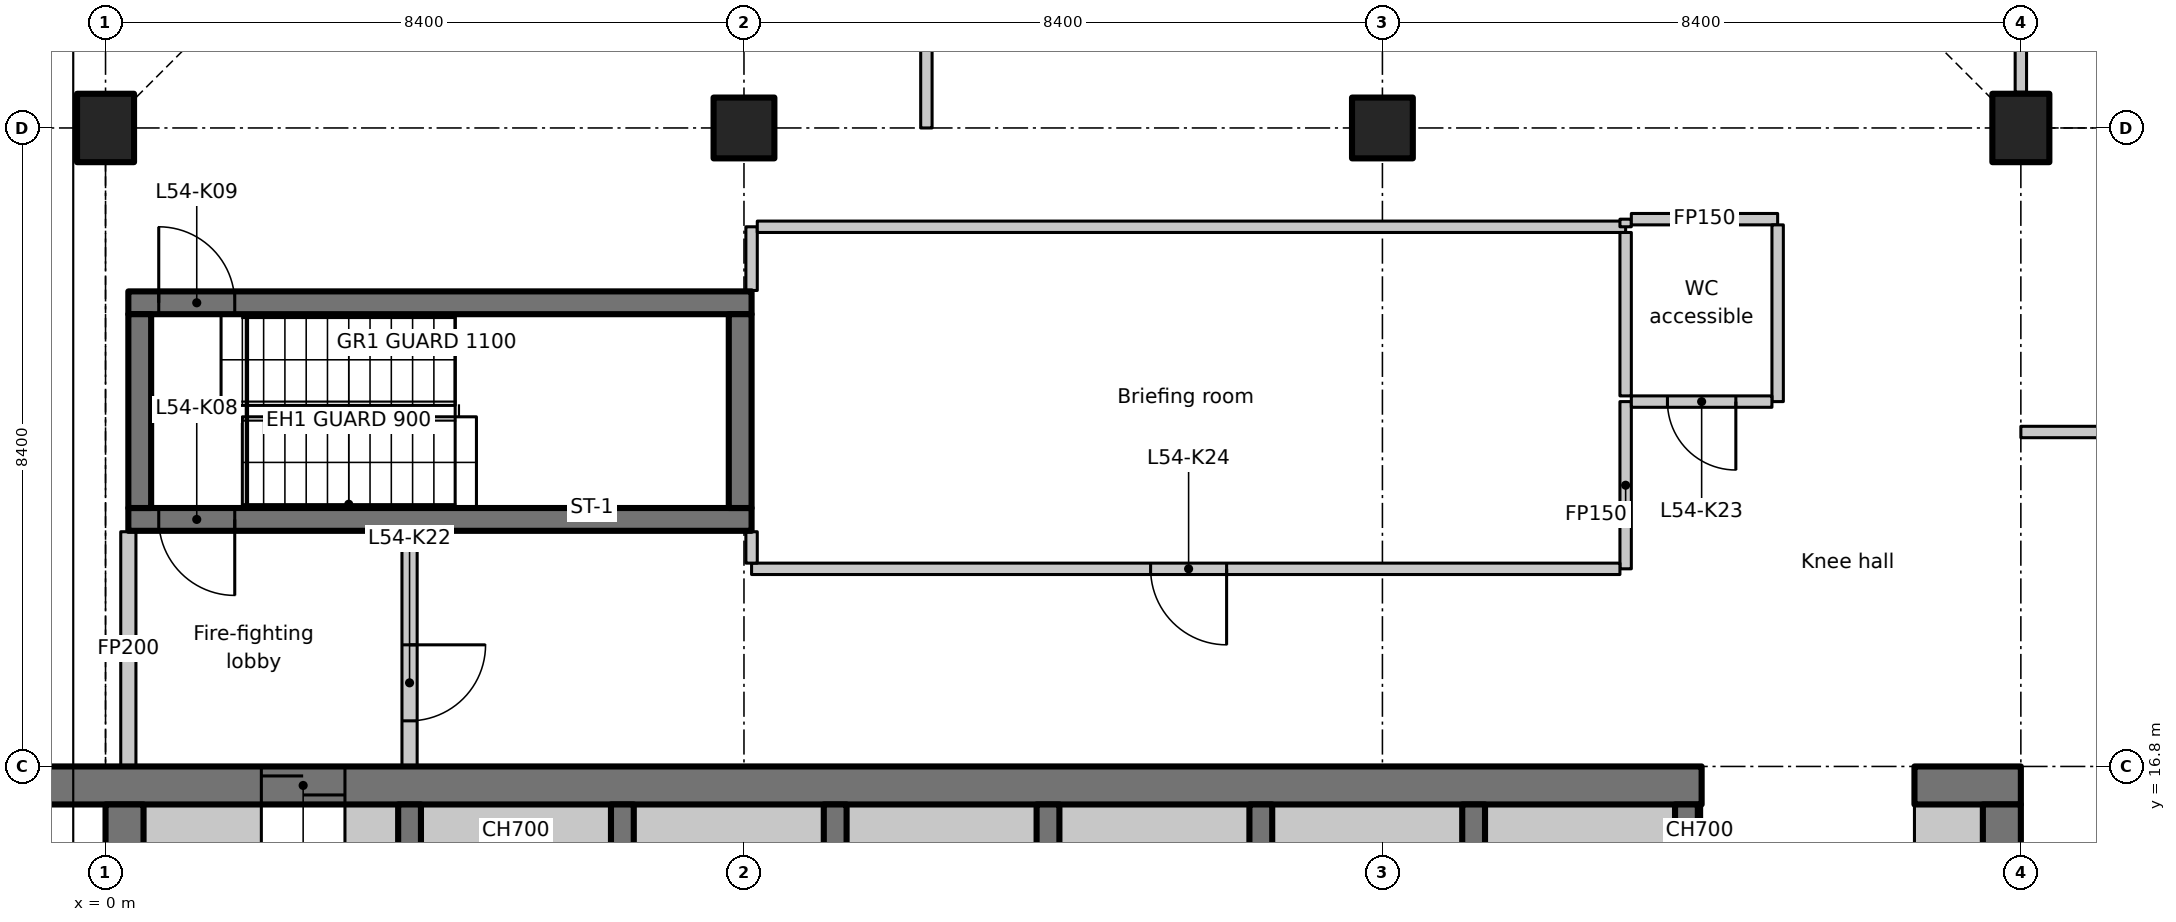
"""IFC4 building model, lengths in metres.
Left out: names, types, materials, properties, quantities, classifications, styles, units other than length and angle.
Written with IfcOpenShell. Run it as: python <this file> out.ifc"""

import sys

from ifc_helpers import new_model, si_unit, direction, frame, frame_2d, origin, origin_2d, place, context, subcontext, project, spatial, polyline, rectangle, outline, extrude, element, fill, save


model = new_model("IFC4")
c1 = context("Model", 3, precision=1e-05, world=origin(), true_north=direction((0.0, 1.0)))
c2 = subcontext(c1, "Body", "Model", "MODEL_VIEW")
j1 = project(units=[si_unit("LENGTHUNIT", "METRE"), si_unit("PLANEANGLEUNIT", "RADIAN")], contexts=[c1])
p1 = place(None, origin())
s1 = spatial("IfcSite", under=j1, at=p1, CompositionType="ELEMENT")
p2 = place(p1, origin())
s2 = spatial("IfcBuilding", under=s1, at=p2, CompositionType="ELEMENT")
p3 = place(p2, frame((0.0, 0.0, 215.7)))
s3 = spatial("IfcBuildingStorey", under=s2, at=p3, CompositionType="ELEMENT", Elevation=215.7)
p4 = place(p3, frame((0.0, 25.2, 0.0), z_axis=(0.0, 0.0, 1.0), x_axis=(1.0, 0.0, 0.0)))
e1 = element("IfcColumn", 1, at=p4, inside=s3, PredefinedType="COLUMN", context=c2, shape_type="SweptSolid", body=[
    extrude(rectangle(XDim=0.75, YDim=0.9, at=origin_2d()), origin(), (0.0, 0.0, 1.0), 3.35),
])
for number, where, z_axis, x_axis in (
    (2, (8.4, 25.2, 0.0), (0.0, 0.0, 1.0), (1.0, 0.0, 0.0)),
    (3, (16.8, 25.2, 0.0), (0.0, 0.0, 1.0), (1.0, 0.0, 0.0)),
):
    element("IfcColumn", number, at=place(p3, frame(where, z_axis=z_axis, x_axis=x_axis)), inside=s3, PredefinedType="COLUMN", context=c2, shape_type="SweptSolid", body=[
        extrude(rectangle(XDim=0.8, YDim=0.8, at=origin_2d()), origin(), (0.0, 0.0, 1.0), 3.35),
    ])
p5 = place(p3, frame((25.2, 25.2, 0.0), z_axis=(0.0, 0.0, 1.0), x_axis=(1.0, 0.0, 0.0)))
e4 = element("IfcColumn", 4, at=p5, inside=s3, PredefinedType="COLUMN", context=c2, shape_type="SweptSolid", body=[
    extrude(rectangle(XDim=0.75, YDim=0.9, at=origin_2d()), origin(), (0.0, 0.0, 1.0), 3.35),
])
p6 = place(p3, frame((-1.1, 16.55, 0.0), z_axis=(0.0, 0.0, 1.0), x_axis=(1.0, 0.0, 0.0)))
e5 = element("IfcWall", 5, at=p6, inside=s3, PredefinedType="SHEAR", context=c2, shape_type="SweptSolid", body=[
    extrude(rectangle(XDim=22.1, YDim=0.5, at=frame_2d((11.05, 0.0))), origin(), (0.0, 0.0, 1.0), 3.35),
])
p7 = place(p6, frame((3.15, 0.0, 0.0)))
e6 = element("IfcOpeningElement", 6, at=p7, cuts=e5, PredefinedType="OPENING", context=c2, shape_type="SweptSolid", body=[
    extrude(rectangle(XDim=1.1, YDim=2.3, at=frame_2d((0.55, 1.15))), frame((0.0, 0.26, 0.0), z_axis=(0.0, -1.0, 0.0), x_axis=(1.0, 0.0, 0.0)), (0.0, 0.0, 1.0), 0.52),
])
p8 = place(p3, frame((23.8, 16.55, 0.0), z_axis=(0.0, 0.0, 1.0), x_axis=(1.0, 0.0, 0.0)))
e7 = element("IfcWall", 7, at=p8, inside=s3, PredefinedType="SHEAR", context=c2, shape_type="SweptSolid", body=[
    extrude(rectangle(XDim=1.4, YDim=0.5, at=frame_2d((0.7, 0.0))), origin(), (0.0, 0.0, 1.0), 3.35),
])
p9 = place(p3, frame((0.25, 7.436, 0.0), z_axis=(0.0, 0.0, 1.0), x_axis=(0.0, 1.0, 0.0)))
e8 = element("IfcWall", 8, at=p9, inside=s3, PredefinedType="SHEAR", context=c2, shape_type="SweptSolid", body=[
    extrude(rectangle(XDim=8.864, YDim=0.5, at=frame_2d((4.432, 0.0))), origin(), (0.0, 0.0, 1.0), 3.35),
])
p10 = place(p3, frame((24.95, 12.6, 0.0), z_axis=(0.0, 0.0, 1.0), x_axis=(0.0, 1.0, 0.0)))
e9 = element("IfcWall", 9, at=p10, inside=s3, PredefinedType="SHEAR", context=c2, shape_type="SweptSolid", body=[
    extrude(rectangle(XDim=3.7, YDim=0.5, at=frame_2d((1.85, 0.0))), origin(), (0.0, 0.0, 1.0), 3.35),
])
p11 = place(p3, frame((0.5, 15.95, 0.0), z_axis=(0.0, 0.0, 1.0), x_axis=(1.0, 0.0, 0.0)))
e10 = element("IfcWall", 10, at=p11, inside=s3, PredefinedType="PARTITIONING", context=c2, shape_type="SweptSolid", body=[
    extrude(rectangle(XDim=1.55, YDim=0.7, at=frame_2d((0.775, 0.0))), origin(), (0.0, 0.0, 1.0), 3.35),
])
p12 = place(p3, frame((23.8, 15.95, 0.0), z_axis=(0.0, 0.0, 1.0), x_axis=(1.0, 0.0, 0.0)))
e11 = element("IfcWall", 11, at=p12, inside=s3, PredefinedType="PARTITIONING", context=c2, shape_type="SweptSolid", body=[
    extrude(rectangle(XDim=0.9, YDim=0.7, at=frame_2d((0.45, 0.0))), origin(), (0.0, 0.0, 1.0), 3.35),
])
for number, where, z_axis, x_axis in (
    (12, (4.0, 12.95, 0.0), (0.0, 0.0, 1.0), (0.0, 1.0, 0.0)),
    (13, (6.8, 12.95, 0.0), (0.0, 0.0, 1.0), (0.0, 1.0, 0.0)),
    (14, (9.6, 12.95, 0.0), (0.0, 0.0, 1.0), (0.0, 1.0, 0.0)),
    (15, (12.4, 12.95, 0.0), (0.0, 0.0, 1.0), (0.0, 1.0, 0.0)),
    (16, (15.2, 12.95, 0.0), (0.0, 0.0, 1.0), (0.0, 1.0, 0.0)),
    (17, (18.0, 12.95, 0.0), (0.0, 0.0, 1.0), (0.0, 1.0, 0.0)),
    (18, (20.8, 12.95, 0.0), (0.0, 0.0, 1.0), (0.0, 1.0, 0.0)),
):
    element("IfcWall", number, at=place(p3, frame(where, z_axis=z_axis, x_axis=x_axis)), inside=s3, PredefinedType="SHEAR", context=c2, shape_type="SweptSolid", body=[
        extrude(rectangle(XDim=3.35, YDim=0.3, at=frame_2d((1.675, 0.0))), origin(), (0.0, 0.0, 1.0), 3.35),
    ])
p13 = place(p3, frame((8.5, 20.05, 0.0), z_axis=(0.0, 0.0, 1.0), x_axis=(-1.0, 0.0, 0.0)))
e19 = element("IfcWall", 19, at=p13, inside=s3, PredefinedType="SHEAR", context=c2, shape_type="SweptSolid", body=[
    extrude(rectangle(XDim=8.2, YDim=0.3, at=frame_2d((4.1, 0.0))), origin(), (0.0, 0.0, 1.0), 3.35),
])
p14 = place(p13, frame((6.8, 0.0, 0.0)))
e20 = element("IfcOpeningElement", 20, at=p14, cuts=e19, PredefinedType="OPENING", context=c2, shape_type="SweptSolid", body=[
    extrude(rectangle(XDim=1.0, YDim=2.1, at=frame_2d((0.5, 1.05))), frame((0.0, 0.16, 0.0), z_axis=(0.0, -1.0, 0.0), x_axis=(1.0, 0.0, 0.0)), (0.0, 0.0, 1.0), 0.32),
])
p15 = place(p3, frame((0.3, 22.9, 0.0), z_axis=(0.0, 0.0, 1.0), x_axis=(1.0, 0.0, 0.0)))
e21 = element("IfcWall", 21, at=p15, inside=s3, PredefinedType="SHEAR", context=c2, shape_type="SweptSolid", body=[
    extrude(rectangle(XDim=8.2, YDim=0.3, at=frame_2d((4.1, 0.0))), origin(), (0.0, 0.0, 1.0), 3.35),
])
p16 = place(p15, frame((0.4, 0.0, 0.0)))
e22 = element("IfcOpeningElement", 22, at=p16, cuts=e21, PredefinedType="OPENING", context=c2, shape_type="SweptSolid", body=[
    extrude(rectangle(XDim=1.0, YDim=2.1, at=frame_2d((0.5, 1.05))), frame((0.0, 0.16, 0.0), z_axis=(0.0, -1.0, 0.0), x_axis=(1.0, 0.0, 0.0)), (0.0, 0.0, 1.0), 0.32),
])
for number, where, z_axis, x_axis in (
    (23, (0.45, 20.2, 0.0), (0.0, 0.0, 1.0), (0.0, 1.0, 0.0)),
    (24, (8.35, 20.2, 0.0), (0.0, 0.0, 1.0), (0.0, 1.0, 0.0)),
):
    element("IfcWall", number, at=place(p3, frame(where, z_axis=z_axis, x_axis=x_axis)), inside=s3, PredefinedType="SHEAR", context=c2, shape_type="SweptSolid", body=[
        extrude(rectangle(XDim=2.55, YDim=0.3, at=frame_2d((1.275, 0.0))), origin(), (0.0, 0.0, 1.0), 3.35),
    ])
p17 = place(p3, frame((0.3, 16.812, 0.0), z_axis=(0.0, 0.0, 1.0), x_axis=(0.0, 1.0, 0.0)))
e25 = element("IfcWall", 25, at=p17, inside=s3, PredefinedType="PARTITIONING", context=c2, shape_type="SweptSolid", body=[
    extrude(rectangle(XDim=3.076, YDim=0.2, at=frame_2d((1.538, 0.0))), origin(), (0.0, 0.0, 1.0), 2.98),
])
p18 = place(p3, frame((4.0, 19.888, 0.0), z_axis=(0.0, 0.0, 1.0), x_axis=(0.0, -1.0, 0.0)))
e26 = element("IfcWall", 26, at=p18, inside=s3, PredefinedType="PARTITIONING", context=c2, shape_type="SweptSolid", body=[
    extrude(rectangle(XDim=3.076, YDim=0.2, at=frame_2d((1.538, 0.0))), origin(), (0.0, 0.0, 1.0), 3.35),
])
p19 = place(p18, frame((1.488, 0.0, 0.0)))
e27 = element("IfcOpeningElement", 27, at=p19, cuts=e26, PredefinedType="OPENING", context=c2, shape_type="SweptSolid", body=[
    extrude(rectangle(XDim=1.0, YDim=2.1, at=frame_2d((0.5, 1.05))), frame((0.0, 0.11, 0.0), z_axis=(0.0, -1.0, 0.0), x_axis=(1.0, 0.0, 0.0)), (0.0, 0.0, 1.0), 0.22),
])
p20 = place(p3, frame((20.0, 21.6, 0.0), z_axis=(0.0, 0.0, 1.0), x_axis=(0.0, -1.0, 0.0)))
e28 = element("IfcWall", 28, at=p20, inside=s3, PredefinedType="PARTITIONING", context=c2, shape_type="SweptSolid", body=[
    extrude(rectangle(XDim=2.2, YDim=0.15, at=frame_2d((1.1, 0.0))), origin(), (0.0, 0.0, 1.0), 3.35),
])
p21 = place(p3, frame((19.925, 19.4, 0.0), z_axis=(0.0, 0.0, 1.0), x_axis=(-1.0, 0.0, 0.0)))
e29 = element("IfcWall", 29, at=p21, inside=s3, PredefinedType="PARTITIONING", context=c2, shape_type="SweptSolid", body=[
    extrude(rectangle(XDim=11.425, YDim=0.15, at=frame_2d((5.712, 0.0))), origin(), (0.0, 0.0, 1.0), 3.35),
])
p22 = place(p21, frame((5.175, 0.0, 0.0)))
e30 = element("IfcOpeningElement", 30, at=p22, cuts=e29, PredefinedType="OPENING", context=c2, shape_type="SweptSolid", body=[
    extrude(rectangle(XDim=1.0, YDim=2.1, at=frame_2d((0.5, 1.05))), frame((0.0, 0.085, 0.0), z_axis=(0.0, -1.0, 0.0), x_axis=(1.0, 0.0, 0.0)), (0.0, 0.0, 1.0), 0.17),
])
p23 = place(p3, frame((8.5, 19.475, 0.0), z_axis=(0.0, 0.0, 1.0), x_axis=(0.0, 1.0, 0.0)))
e31 = element("IfcWall", 31, at=p23, inside=s3, PredefinedType="PARTITIONING", context=c2, shape_type="SweptSolid", body=[
    extrude(rectangle(XDim=0.413, YDim=0.15, at=frame_2d((0.207, 0.0))), origin(), (0.0, 0.0, 1.0), 3.35),
])
p24 = place(p3, frame((8.5, 23.062, 0.0), z_axis=(0.0, 0.0, 1.0), x_axis=(0.0, 1.0, 0.0)))
e32 = element("IfcWall", 32, at=p24, inside=s3, PredefinedType="PARTITIONING", context=c2, shape_type="SweptSolid", body=[
    extrude(rectangle(XDim=0.838, YDim=0.15, at=frame_2d((0.419, 0.0))), origin(), (0.0, 0.0, 1.0), 3.35),
])
p25 = place(p3, frame((8.575, 23.9, 0.0), z_axis=(0.0, 0.0, 1.0), x_axis=(1.0, 0.0, 0.0)))
e33 = element("IfcWall", 33, at=p25, inside=s3, PredefinedType="PARTITIONING", context=c2, shape_type="SweptSolid", body=[
    extrude(rectangle(XDim=11.425, YDim=0.15, at=frame_2d((5.712, 0.0))), origin(), (0.0, 0.0, 1.0), 3.35),
])
p26 = place(p3, frame((20.0, 23.9, 0.0), z_axis=(0.0, 0.0, 1.0), x_axis=(0.0, 1.0, 0.0)))
e34 = element("IfcWall", 34, at=p26, inside=s3, PredefinedType="PARTITIONING", context=c2, shape_type="SweptSolid", body=[
    extrude(rectangle(XDim=0.1, YDim=0.15, at=frame_2d((0.05, 0.0))), origin(), (0.0, 0.0, 1.0), 3.35),
])
p27 = place(p3, frame((20.075, 24.0, 0.0), z_axis=(0.0, 0.0, 1.0), x_axis=(1.0, 0.0, 0.0)))
e35 = element("IfcWall", 35, at=p27, inside=s3, PredefinedType="PARTITIONING", context=c2, shape_type="SweptSolid", body=[
    extrude(rectangle(XDim=1.925, YDim=0.15, at=frame_2d((0.962, 0.0))), origin(), (0.0, 0.0, 1.0), 3.35),
])
p28 = place(p3, frame((22.0, 23.925, 0.0), z_axis=(0.0, 0.0, 1.0), x_axis=(0.0, -1.0, 0.0)))
e36 = element("IfcWall", 36, at=p28, inside=s3, PredefinedType="PARTITIONING", context=c2, shape_type="SweptSolid", body=[
    extrude(rectangle(XDim=2.325, YDim=0.15, at=frame_2d((1.163, 0.0))), origin(), (0.0, 0.0, 1.0), 3.35),
])
p29 = place(p3, frame((21.925, 21.6, 0.0), z_axis=(0.0, 0.0, 1.0), x_axis=(-1.0, 0.0, 0.0)))
e37 = element("IfcWall", 37, at=p29, inside=s3, PredefinedType="PARTITIONING", context=c2, shape_type="SweptSolid", body=[
    extrude(rectangle(XDim=1.85, YDim=0.15, at=frame_2d((0.925, 0.0))), origin(), (0.0, 0.0, 1.0), 3.35),
])
p30 = place(p29, frame((0.475, 0.0, 0.0)))
e38 = element("IfcOpeningElement", 38, at=p30, cuts=e37, PredefinedType="OPENING", context=c2, shape_type="SweptSolid", body=[
    extrude(rectangle(XDim=0.9, YDim=2.1, at=frame_2d((0.45, 1.05))), frame((0.0, 0.085, 0.0), z_axis=(0.0, -1.0, 0.0), x_axis=(1.0, 0.0, 0.0)), (0.0, 0.0, 1.0), 0.17),
])
p31 = place(p3, frame((20.0, 21.675, 0.0), z_axis=(0.0, 0.0, 1.0), x_axis=(0.0, 1.0, 0.0)))
e39 = element("IfcWall", 39, at=p31, inside=s3, PredefinedType="PARTITIONING", context=c2, shape_type="SweptSolid", body=[
    extrude(rectangle(XDim=2.15, YDim=0.15, at=frame_2d((1.075, 0.0))), origin(), (0.0, 0.0, 1.0), 3.35),
])
p32 = place(p3, frame((3.15, 15.95, 0.0), z_axis=(0.0, 0.0, 1.0), x_axis=(1.0, 0.0, 0.0)))
e40 = element("IfcWall", 40, at=p32, inside=s3, PredefinedType="PARTITIONING", context=c2, shape_type="SweptSolid", body=[
    extrude(rectangle(XDim=0.7, YDim=0.7, at=frame_2d((0.35, 0.0))), origin(), (0.0, 0.0, 1.0), 3.35),
])
for number, where, z_axis, x_axis in (
    (41, (4.15, 15.95, 0.0), (0.0, 0.0, 1.0), (1.0, 0.0, 0.0)),
    (42, (6.95, 15.95, 0.0), (0.0, 0.0, 1.0), (1.0, 0.0, 0.0)),
    (43, (9.75, 15.95, 0.0), (0.0, 0.0, 1.0), (1.0, 0.0, 0.0)),
    (44, (12.55, 15.95, 0.0), (0.0, 0.0, 1.0), (1.0, 0.0, 0.0)),
    (45, (15.35, 15.95, 0.0), (0.0, 0.0, 1.0), (1.0, 0.0, 0.0)),
    (46, (18.15, 15.95, 0.0), (0.0, 0.0, 1.0), (1.0, 0.0, 0.0)),
):
    element("IfcWall", number, at=place(p3, frame(where, z_axis=z_axis, x_axis=x_axis)), inside=s3, PredefinedType="PARTITIONING", context=c2, shape_type="SweptSolid", body=[
        extrude(rectangle(XDim=2.5, YDim=0.7, at=frame_2d((1.25, 0.0))), origin(), (0.0, 0.0, 1.0), 3.35),
    ])
p33 = place(p3, frame((20.95, 15.95, 0.0), z_axis=(0.0, 0.0, 1.0), x_axis=(1.0, 0.0, 0.0)))
e47 = element("IfcWall", 47, at=p33, inside=s3, PredefinedType="PARTITIONING", context=c2, shape_type="SweptSolid", body=[
    extrude(rectangle(XDim=0.05, YDim=0.7, at=frame_2d((0.025, 0.0))), origin(), (0.0, 0.0, 1.0), 3.35),
])
p34 = place(p3, frame((25.2, 21.2, 0.0), z_axis=(0.0, 0.0, 1.0), x_axis=(1.0, 0.0, 0.0)))
e48 = element("IfcWall", 48, at=p34, inside=s3, PredefinedType="PARTITIONING", context=c2, shape_type="SweptSolid", body=[
    extrude(rectangle(XDim=4.2, YDim=0.15, at=frame_2d((2.1, 0.0))), origin(), (0.0, 0.0, 1.0), 3.33),
])
p35 = place(p34, frame((1.5, 0.0, 0.0)))
e49 = element("IfcOpeningElement", 49, at=p35, cuts=e48, PredefinedType="OPENING", context=c2, shape_type="SweptSolid", body=[
    extrude(rectangle(XDim=1.0, YDim=2.1, at=frame_2d((0.5, 1.05))), frame((0.0, 0.085, 0.0), z_axis=(0.0, -1.0, 0.0), x_axis=(1.0, 0.0, 0.0)), (0.0, 0.0, 1.0), 0.17),
])
p36 = place(p3, frame((25.2, 25.67, 0.0), z_axis=(0.0, 0.0, 1.0), x_axis=(0.0, 1.0, 0.0)))
e50 = element("IfcWall", 50, at=p36, inside=s3, PredefinedType="PARTITIONING", context=c2, shape_type="SweptSolid", body=[
    extrude(rectangle(XDim=3.93, YDim=0.15, at=frame_2d((1.965, 0.0))), origin(), (0.0, 0.0, 1.0), 2.98),
])
p37 = place(p3, frame((10.8, 25.2, 0.0), z_axis=(0.0, 0.0, 1.0), x_axis=(0.0, 1.0, 0.0)))
e51 = element("IfcWall", 51, at=p37, inside=s3, PredefinedType="PARTITIONING", context=c2, shape_type="SweptSolid", body=[
    extrude(outline(polyline([(0.0, 0.0), (8.4, 0.0), (8.4, 2.98), (7.952, 2.98), (7.95, 3.33), (0.0, 3.33), (0.0, 0.0)])), frame((0.0, 0.075, 0.0), z_axis=(0.0, -1.0, 0.0), x_axis=(1.0, 0.0, 0.0)), (0.0, 0.0, 1.0), 0.15),
])
p38 = place(p37, frame((3.3, 0.0, 0.0)))
e52 = element("IfcOpeningElement", 52, at=p38, cuts=e51, PredefinedType="OPENING", context=c2, shape_type="SweptSolid", body=[
    extrude(rectangle(XDim=1.6, YDim=2.1, at=frame_2d((0.8, 1.05))), frame((0.0, 0.085, 0.0), z_axis=(0.0, -1.0, 0.0), x_axis=(1.0, 0.0, 0.0)), (0.0, 0.0, 1.0), 0.17),
])
p39 = place(p7, origin())
e53 = element("IfcDoor", 53, at=p39, inside=s3, OperationType="SLIDING_TO_LEFT", PredefinedType="DOOR", context=c2, shape_type="SweptSolid", body=[
    extrude(rectangle(XDim=1.1, YDim=2.3, at=frame_2d((0.55, 1.15))), frame((0.0, 0.025, 0.0), z_axis=(0.0, -1.0, 0.0), x_axis=(1.0, 0.0, 0.0)), (0.0, 0.0, 1.0), 0.05),
])
fill(e6, e53)
p40 = place(p14, origin())
e54 = element("IfcDoor", 54, at=p40, inside=s3, OperationType="SINGLE_SWING_LEFT", PredefinedType="DOOR", context=c2, shape_type="SweptSolid", body=[
    extrude(rectangle(XDim=1.0, YDim=2.1, at=frame_2d((0.5, 1.05))), frame((0.0, 0.025, 0.0), z_axis=(0.0, -1.0, 0.0), x_axis=(1.0, 0.0, 0.0)), (0.0, 0.0, 1.0), 0.05),
])
fill(e20, e54)
p41 = place(p16, origin())
e55 = element("IfcDoor", 55, at=p41, inside=s3, OperationType="SINGLE_SWING_RIGHT", PredefinedType="DOOR", context=c2, shape_type="SweptSolid", body=[
    extrude(rectangle(XDim=1.0, YDim=2.1, at=frame_2d((0.5, 1.05))), frame((0.0, 0.025, 0.0), z_axis=(0.0, -1.0, 0.0), x_axis=(1.0, 0.0, 0.0)), (0.0, 0.0, 1.0), 0.05),
])
fill(e22, e55)
p42 = place(p19, origin())
e56 = element("IfcDoor", 56, at=p42, inside=s3, OperationType="SINGLE_SWING_LEFT", PredefinedType="DOOR", context=c2, shape_type="SweptSolid", body=[
    extrude(rectangle(XDim=1.0, YDim=2.1, at=frame_2d((0.5, 1.05))), frame((0.0, 0.025, 0.0), z_axis=(0.0, -1.0, 0.0), x_axis=(1.0, 0.0, 0.0)), (0.0, 0.0, 1.0), 0.05),
])
fill(e27, e56)
p43 = place(p30, origin())
e57 = element("IfcDoor", 57, at=p43, inside=s3, OperationType="SINGLE_SWING_RIGHT", PredefinedType="DOOR", context=c2, shape_type="SweptSolid", body=[
    extrude(rectangle(XDim=0.9, YDim=2.1, at=frame_2d((0.45, 1.05))), frame((0.0, 0.025, 0.0), z_axis=(0.0, -1.0, 0.0), x_axis=(1.0, 0.0, 0.0)), (0.0, 0.0, 1.0), 0.05),
])
fill(e38, e57)
p44 = place(p22, origin())
e58 = element("IfcDoor", 58, at=p44, inside=s3, OperationType="SINGLE_SWING_LEFT", PredefinedType="DOOR", context=c2, shape_type="SweptSolid", body=[
    extrude(rectangle(XDim=1.0, YDim=2.1, at=frame_2d((0.5, 1.05))), frame((0.0, 0.025, 0.0), z_axis=(0.0, -1.0, 0.0), x_axis=(1.0, 0.0, 0.0)), (0.0, 0.0, 1.0), 0.05),
])
fill(e30, e58)
save(model, sys.argv[1])
